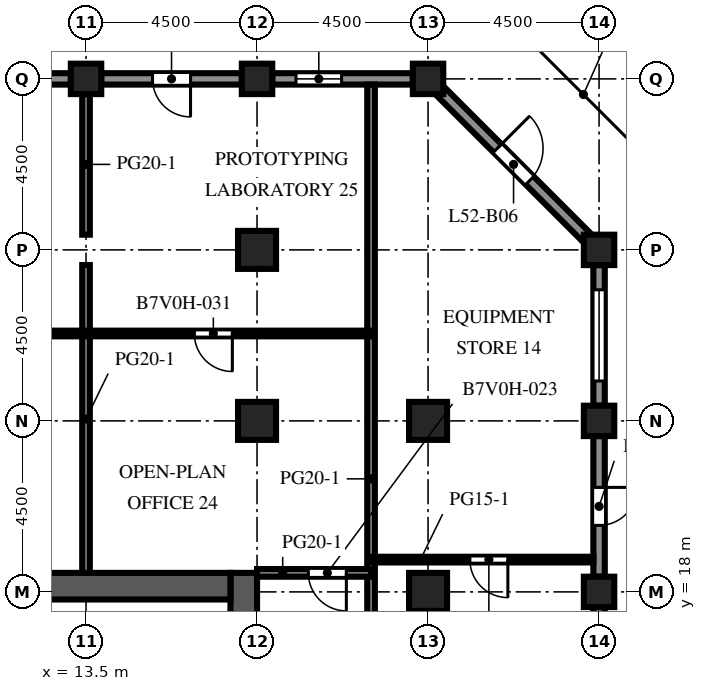
"""IFC4 building model, lengths in metres.
Left out: names, types, materials, properties, quantities, classifications, styles, units other than length and angle.
Written with IfcOpenShell. Run it as: python <this file> out.ifc"""

import sys

from ifc_helpers import new_model, si_unit, direction, frame, frame_2d, origin, origin_2d, place, context, subcontext, project, spatial, rectangle, extrude, element, fill, save


model = new_model("IFC4")
c1 = context("Model", 3, precision=1e-05, world=origin(), true_north=direction((0.0, 1.0)))
c2 = subcontext(c1, "Body", "Model", "MODEL_VIEW")
j1 = project(units=[si_unit("LENGTHUNIT", "METRE"), si_unit("PLANEANGLEUNIT", "RADIAN")], contexts=[c1])
p1 = place(None, origin())
s1 = spatial("IfcSite", under=j1, at=p1, CompositionType="ELEMENT")
p2 = place(p1, origin())
s2 = spatial("IfcBuilding", under=s1, at=p2, CompositionType="ELEMENT")
p3 = place(p2, frame((0.0, 0.0, 231.6)))
s3 = spatial("IfcBuildingStorey", under=s2, at=p3, CompositionType="ELEMENT", Elevation=231.6)
for number, where, z_axis, x_axis in (
    (1, (13.5, 31.5, -0.45), (0.0, 0.0, 1.0), (1.0, 0.0, 0.0)),
    (2, (18.0, 31.5, -0.45), (0.0, 0.0, 1.0), (1.0, 0.0, 0.0)),
    (3, (22.5, 31.5, -0.45), (0.0, 0.0, 1.0), (1.0, 0.0, 0.0)),
):
    element("IfcColumn", number, at=place(p3, frame(where, z_axis=z_axis, x_axis=x_axis)), inside=s3, PredefinedType="COLUMN", context=c2, shape_type="SweptSolid", body=[
        extrude(rectangle(XDim=0.8, YDim=0.8, at=origin_2d()), origin(), (0.0, 0.0, 1.0), 4.55),
    ])
for number, where, z_axis, x_axis in (
    (4, (27.0, 18.0, 0.0), (0.0, 0.0, 1.0), (1.0, 0.0, 0.0)),
    (5, (27.0, 22.5, 0.0), (0.0, 0.0, 1.0), (1.0, 0.0, 0.0)),
    (6, (27.0, 27.0, 0.0), (0.0, 0.0, 1.0), (1.0, 0.0, 0.0)),
):
    element("IfcColumn", number, at=place(p3, frame(where, z_axis=z_axis, x_axis=x_axis)), inside=s3, PredefinedType="COLUMN", context=c2, shape_type="SweptSolid", body=[
        extrude(rectangle(XDim=0.8, YDim=0.8, at=origin_2d()), origin(), (0.0, 0.0, 1.0), 4.1),
    ])
for number, where, z_axis, x_axis in (
    (7, (18.0, 22.5, -0.45), (0.0, 0.0, 1.0), (1.0, 0.0, 0.0)),
    (8, (18.0, 27.0, -0.45), (0.0, 0.0, 1.0), (1.0, 0.0, 0.0)),
):
    element("IfcColumn", number, at=place(p3, frame(where, z_axis=z_axis, x_axis=x_axis)), inside=s3, PredefinedType="COLUMN", context=c2, shape_type="SweptSolid", body=[
        extrude(rectangle(XDim=1.0, YDim=1.0, at=origin_2d()), origin(), (0.0, 0.0, 1.0), 4.55),
    ])
for number, where, z_axis, x_axis in (
    (9, (22.5, 18.0, 0.0), (0.0, 0.0, 1.0), (1.0, 0.0, 0.0)),
    (10, (22.5, 22.5, 0.0), (0.0, 0.0, 1.0), (1.0, 0.0, 0.0)),
):
    element("IfcColumn", number, at=place(p3, frame(where, z_axis=z_axis, x_axis=x_axis)), inside=s3, PredefinedType="COLUMN", context=c2, shape_type="SweptSolid", body=[
        extrude(rectangle(XDim=1.0, YDim=1.0, at=origin_2d()), origin(), (0.0, 0.0, 1.0), 4.1),
    ])
p4 = place(p3, frame((17.65, -9.0, 0.0), z_axis=(0.0, 0.0, 1.0), x_axis=(0.0, 1.0, 0.0)))
e11 = element("IfcWall", 11, at=p4, inside=s3, PredefinedType="SHEAR", context=c2, shape_type="SweptSolid", body=[
    extrude(rectangle(XDim=27.5, YDim=0.7, at=frame_2d((13.75, 0.0))), origin(), (0.0, 0.0, 1.0), 4.1),
])
p5 = place(p4, frame((12.55, 0.0, 0.0)))
e12 = element("IfcOpeningElement", 12, at=p5, cuts=e11, PredefinedType="OPENING", context=c2, shape_type="SweptSolid", body=[
    extrude(rectangle(XDim=2.4, YDim=2.4, at=frame_2d((1.2, 1.2))), frame((0.0, 0.36, 0.0), z_axis=(0.0, -1.0, 0.0), x_axis=(1.0, 0.0, 0.0)), (0.0, 0.0, 1.0), 0.72),
])
p6 = place(p4, frame((6.825, 0.0, 0.0)))
e13 = element("IfcOpeningElement", 13, at=p6, cuts=e11, PredefinedType="OPENING", context=c2, shape_type="SweptSolid", body=[
    extrude(rectangle(XDim=1.2, YDim=2.1, at=frame_2d((0.6, 1.05))), frame((0.0, 0.36, 0.0), z_axis=(0.0, -1.0, 0.0), x_axis=(1.0, 0.0, 0.0)), (0.0, 0.0, 1.0), 0.72),
])
p7 = place(p4, frame((19.475, 0.0, 0.0)))
e14 = element("IfcOpeningElement", 14, at=p7, cuts=e11, PredefinedType="OPENING", context=c2, shape_type="SweptSolid", body=[
    extrude(rectangle(XDim=1.2, YDim=2.1, at=frame_2d((0.6, 1.05))), frame((0.0, 0.36, 0.0), z_axis=(0.0, -1.0, 0.0), x_axis=(1.0, 0.0, 0.0)), (0.0, 0.0, 1.0), 0.72),
])
p8 = place(p3, frame((6.7, 18.15, 0.0), z_axis=(0.0, 0.0, 1.0), x_axis=(1.0, 0.0, 0.0)))
e15 = element("IfcWall", 15, at=p8, inside=s3, PredefinedType="SHEAR", context=c2, shape_type="SweptSolid", body=[
    extrude(rectangle(XDim=10.6, YDim=0.7, at=frame_2d((5.3, 0.0))), origin(), (0.0, 0.0, 1.0), 4.1),
])
p9 = place(p3, frame((27.0, 17.6, 0.0), z_axis=(0.0, 0.0, 1.0), x_axis=(0.0, -1.0, 0.0)))
e16 = element("IfcWall", 16, at=p9, inside=s3, PredefinedType="SOLIDWALL", context=c2, shape_type="SweptSolid", body=[
    extrude(rectangle(XDim=3.7, YDim=0.3, at=frame_2d((1.85, 0.0))), origin(), (0.0, 0.0, 1.0), 2.85),
])
p10 = place(p9, frame((0.65, 0.0, 0.8)))
e17 = element("IfcOpeningElement", 17, at=p10, cuts=e16, PredefinedType="OPENING", context=c2, shape_type="SweptSolid", body=[
    extrude(rectangle(XDim=2.4, YDim=1.7, at=frame_2d((1.2, 0.85))), frame((0.0, 0.16, 0.0), z_axis=(0.0, -1.0, 0.0), x_axis=(1.0, 0.0, 0.0)), (0.0, 0.0, 1.0), 0.32),
])
p11 = place(p3, frame((27.0, 22.1, 0.0), z_axis=(0.0, 0.0, 1.0), x_axis=(0.0, -1.0, 0.0)))
e18 = element("IfcWall", 18, at=p11, inside=s3, PredefinedType="SOLIDWALL", context=c2, shape_type="SweptSolid", body=[
    extrude(rectangle(XDim=3.7, YDim=0.3, at=frame_2d((1.85, 0.0))), origin(), (0.0, 0.0, 1.0), 2.85),
])
p12 = place(p11, frame((1.35, 0.0, 0.0)))
e19 = element("IfcOpeningElement", 19, at=p12, cuts=e18, PredefinedType="OPENING", context=c2, shape_type="SweptSolid", body=[
    extrude(rectangle(XDim=1.0, YDim=2.2, at=frame_2d((0.5, 1.1))), frame((0.0, 0.16, 0.0), z_axis=(0.0, -1.0, 0.0), x_axis=(1.0, 0.0, 0.0)), (0.0, 0.0, 1.0), 0.32),
])
p13 = place(p3, frame((27.0, 26.6, 0.0), z_axis=(0.0, 0.0, 1.0), x_axis=(0.0, -1.0, 0.0)))
e20 = element("IfcWall", 20, at=p13, inside=s3, PredefinedType="SOLIDWALL", context=c2, shape_type="SweptSolid", body=[
    extrude(rectangle(XDim=3.7, YDim=0.3, at=frame_2d((1.85, 0.0))), origin(), (0.0, 0.0, 1.0), 2.85),
])
p14 = place(p13, frame((0.65, 0.0, 0.8)))
e21 = element("IfcOpeningElement", 21, at=p14, cuts=e20, PredefinedType="OPENING", context=c2, shape_type="SweptSolid", body=[
    extrude(rectangle(XDim=2.4, YDim=1.7, at=frame_2d((1.2, 0.85))), frame((0.0, 0.16, 0.0), z_axis=(0.0, -1.0, 0.0), x_axis=(1.0, 0.0, 0.0)), (0.0, 0.0, 1.0), 0.32),
])
p15 = place(p3, frame((22.794, 31.206, 0.0), z_axis=(0.0, 0.0, 1.0), x_axis=(0.707106781187, -0.707106781187, 0.0)))
e22 = element("IfcWall", 22, at=p15, inside=s3, PredefinedType="SOLIDWALL", context=c2, shape_type="SweptSolid", body=[
    extrude(rectangle(XDim=5.532, YDim=0.3, at=frame_2d((2.766, 0.0))), origin(), (0.0, 0.0, 1.0), 2.85),
])
p16 = place(p15, frame((2.166, 0.0, 0.0)))
e23 = element("IfcOpeningElement", 23, at=p16, cuts=e22, PredefinedType="OPENING", context=c2, shape_type="SweptSolid", body=[
    extrude(rectangle(XDim=1.2, YDim=2.2, at=frame_2d((0.6, 1.1))), frame((0.0, 0.16, 0.0), z_axis=(0.0, -1.0, 0.0), x_axis=(1.0, 0.0, 0.0)), (0.0, 0.0, 1.0), 0.32),
])
p17 = place(p3, frame((18.4, 31.5, 0.0), z_axis=(0.0, 0.0, 1.0), x_axis=(1.0, 0.0, 0.0)))
e24 = element("IfcWall", 24, at=p17, inside=s3, PredefinedType="SOLIDWALL", context=c2, shape_type="SweptSolid", body=[
    extrude(rectangle(XDim=3.7, YDim=0.3, at=frame_2d((1.85, 0.0))), origin(), (0.0, 0.0, 1.0), 2.85),
])
p18 = place(p17, frame((0.625, 0.0, 0.8)))
e25 = element("IfcOpeningElement", 25, at=p18, cuts=e24, PredefinedType="OPENING", context=c2, shape_type="SweptSolid", body=[
    extrude(rectangle(XDim=1.2, YDim=1.7, at=frame_2d((0.6, 0.85))), frame((0.0, 0.16, 0.0), z_axis=(0.0, -1.0, 0.0), x_axis=(1.0, 0.0, 0.0)), (0.0, 0.0, 1.0), 0.32),
])
p19 = place(p3, frame((13.9, 31.5, 0.0), z_axis=(0.0, 0.0, 1.0), x_axis=(1.0, 0.0, 0.0)))
e26 = element("IfcWall", 26, at=p19, inside=s3, PredefinedType="SOLIDWALL", context=c2, shape_type="SweptSolid", body=[
    extrude(rectangle(XDim=3.7, YDim=0.3, at=frame_2d((1.85, 0.0))), origin(), (0.0, 0.0, 1.0), 2.85),
])
p20 = place(p19, frame((1.35, 0.0, 0.0)))
e27 = element("IfcOpeningElement", 27, at=p20, cuts=e26, PredefinedType="OPENING", context=c2, shape_type="SweptSolid", body=[
    extrude(rectangle(XDim=1.0, YDim=2.2, at=frame_2d((0.5, 1.1))), frame((0.0, 0.16, 0.0), z_axis=(0.0, -1.0, 0.0), x_axis=(1.0, 0.0, 0.0)), (0.0, 0.0, 1.0), 0.32),
])
p21 = place(p3, frame((9.4, 31.5, 0.0), z_axis=(0.0, 0.0, 1.0), x_axis=(1.0, 0.0, 0.0)))
e28 = element("IfcWall", 28, at=p21, inside=s3, PredefinedType="SOLIDWALL", context=c2, shape_type="SweptSolid", body=[
    extrude(rectangle(XDim=3.7, YDim=0.3, at=frame_2d((1.85, 0.0))), origin(), (0.0, 0.0, 1.0), 2.85),
])
p22 = place(p21, frame((0.65, 0.0, 0.8)))
e29 = element("IfcOpeningElement", 29, at=p22, cuts=e28, PredefinedType="OPENING", context=c2, shape_type="SweptSolid", body=[
    extrude(rectangle(XDim=2.4, YDim=1.7, at=frame_2d((1.2, 0.85))), frame((0.0, 0.16, 0.0), z_axis=(0.0, -1.0, 0.0), x_axis=(1.0, 0.0, 0.0)), (0.0, 0.0, 1.0), 0.32),
])
p23 = place(p3, frame((13.5, 18.5, 0.0), z_axis=(0.0, 0.0, 1.0), x_axis=(0.0, 1.0, 0.0)))
e30 = element("IfcWall", 30, at=p23, inside=s3, PredefinedType="PARTITIONING", context=c2, shape_type="SweptSolid", body=[
    extrude(rectangle(XDim=8.1, YDim=0.2, at=frame_2d((4.05, 0.0))), origin(), (0.0, 0.0, 1.0), 3.65),
])
p24 = place(p3, frame((13.5, 27.4, 0.0), z_axis=(0.0, 0.0, 1.0), x_axis=(0.0, 1.0, 0.0)))
e31 = element("IfcWall", 31, at=p24, inside=s3, PredefinedType="PARTITIONING", context=c2, shape_type="SweptSolid", body=[
    extrude(rectangle(XDim=3.7, YDim=0.2, at=frame_2d((1.85, 0.0))), origin(), (0.0, 0.0, 1.0), 3.65),
])
p25 = place(p3, frame((21.0, 31.35, 0.0), z_axis=(0.0, 0.0, 1.0), x_axis=(0.0, -1.0, 0.0)))
e32 = element("IfcWall", 32, at=p25, inside=s3, PredefinedType="PARTITIONING", context=c2, shape_type="SweptSolid", body=[
    extrude(rectangle(XDim=25.1, YDim=0.2, at=frame_2d((12.55, 0.0))), origin(), (0.0, 0.0, 1.0), 3.65),
])
p26 = place(p25, frame((20.75, 0.0, 0.0)))
e33 = element("IfcOpeningElement", 33, at=p26, cuts=e32, PredefinedType="OPENING", context=c2, shape_type="SweptSolid", body=[
    extrude(rectangle(XDim=1.0, YDim=2.1, at=frame_2d((0.5, 1.05))), frame((0.0, 0.11, 0.0), z_axis=(0.0, -1.0, 0.0), x_axis=(1.0, 0.0, 0.0)), (0.0, 0.0, 1.0), 0.22),
])
p27 = place(p3, frame((18.0, 18.5, 0.0), z_axis=(0.0, 0.0, 1.0), x_axis=(1.0, 0.0, 0.0)))
e34 = element("IfcWall", 34, at=p27, inside=s3, PredefinedType="PARTITIONING", context=c2, shape_type="SweptSolid", body=[
    extrude(rectangle(XDim=3.0, YDim=0.2, at=frame_2d((1.5, 0.0))), origin(), (0.0, 0.0, 1.0), 3.65),
])
p28 = place(p27, frame((1.35, 0.0, 0.0)))
e35 = element("IfcOpeningElement", 35, at=p28, cuts=e34, PredefinedType="OPENING", context=c2, shape_type="SweptSolid", body=[
    extrude(rectangle(XDim=1.0, YDim=2.1, at=frame_2d((0.5, 1.05))), frame((0.0, 0.11, 0.0), z_axis=(0.0, -1.0, 0.0), x_axis=(1.0, 0.0, 0.0)), (0.0, 0.0, 1.0), 0.22),
])
p29 = place(p3, frame((21.0, 18.85, 0.0), z_axis=(0.0, 0.0, 1.0), x_axis=(1.0, 0.0, 0.0)))
e36 = element("IfcWall", 36, at=p29, inside=s3, PredefinedType="PARTITIONING", context=c2, shape_type="SweptSolid", body=[
    extrude(rectangle(XDim=5.85, YDim=0.15, at=frame_2d((2.925, 0.0))), origin(), (0.0, 0.0, 1.0), 3.65),
])
p30 = place(p29, frame((2.6, 0.0, 0.0)))
e37 = element("IfcOpeningElement", 37, at=p30, cuts=e36, PredefinedType="OPENING", context=c2, shape_type="SweptSolid", body=[
    extrude(rectangle(XDim=1.0, YDim=2.1, at=frame_2d((0.5, 1.05))), frame((0.0, 0.085, 0.0), z_axis=(0.0, -1.0, 0.0), x_axis=(1.0, 0.0, 0.0)), (0.0, 0.0, 1.0), 0.17),
])
p31 = place(p3, frame((-13.5, 24.8, 0.0), z_axis=(0.0, 0.0, 1.0), x_axis=(1.0, 0.0, 0.0)))
e38 = element("IfcWall", 38, at=p31, inside=s3, PredefinedType="PARTITIONING", context=c2, shape_type="SweptSolid", body=[
    extrude(rectangle(XDim=34.5, YDim=0.15, at=frame_2d((17.25, 0.0))), origin(), (0.0, 0.0, 1.0), 3.65),
])
p32 = place(p31, frame((1.35, 0.0, 0.0)))
e39 = element("IfcOpeningElement", 39, at=p32, cuts=e38, PredefinedType="OPENING", context=c2, shape_type="SweptSolid", body=[
    extrude(rectangle(XDim=1.0, YDim=2.1, at=frame_2d((0.5, 1.05))), frame((0.0, 0.085, 0.0), z_axis=(0.0, -1.0, 0.0), x_axis=(1.0, 0.0, 0.0)), (0.0, 0.0, 1.0), 0.17),
])
p33 = place(p31, frame((12.0, 0.0, 0.0)))
e40 = element("IfcOpeningElement", 40, at=p33, cuts=e38, PredefinedType="OPENING", context=c2, shape_type="SweptSolid", body=[
    extrude(rectangle(XDim=1.0, YDim=2.1, at=frame_2d((0.5, 1.05))), frame((0.0, 0.085, 0.0), z_axis=(0.0, -1.0, 0.0), x_axis=(1.0, 0.0, 0.0)), (0.0, 0.0, 1.0), 0.17),
])
p34 = place(p31, frame((20.85, 0.0, 0.0)))
e41 = element("IfcOpeningElement", 41, at=p34, cuts=e38, PredefinedType="OPENING", context=c2, shape_type="SweptSolid", body=[
    extrude(rectangle(XDim=1.0, YDim=2.1, at=frame_2d((0.5, 1.05))), frame((0.0, 0.085, 0.0), z_axis=(0.0, -1.0, 0.0), x_axis=(1.0, 0.0, 0.0)), (0.0, 0.0, 1.0), 0.17),
])
p35 = place(p31, frame((29.85, 0.0, 0.0)))
e42 = element("IfcOpeningElement", 42, at=p35, cuts=e38, PredefinedType="OPENING", context=c2, shape_type="SweptSolid", body=[
    extrude(rectangle(XDim=1.0, YDim=2.1, at=frame_2d((0.5, 1.05))), frame((0.0, 0.085, 0.0), z_axis=(0.0, -1.0, 0.0), x_axis=(1.0, 0.0, 0.0)), (0.0, 0.0, 1.0), 0.17),
])
p36 = place(p12, origin())
e43 = element("IfcDoor", 43, at=p36, inside=s3, OperationType="SINGLE_SWING_LEFT", PredefinedType="DOOR", context=c2, shape_type="SweptSolid", body=[
    extrude(rectangle(XDim=1.0, YDim=2.2, at=frame_2d((0.5, 1.1))), frame((0.0, 0.025, 0.0), z_axis=(0.0, -1.0, 0.0), x_axis=(1.0, 0.0, 0.0)), (0.0, 0.0, 1.0), 0.05),
])
fill(e19, e43)
p37 = place(p14, origin())
e44 = element("IfcWindow", 44, at=p37, inside=s3, PartitioningType="SINGLE_PANEL", PredefinedType="WINDOW", context=c2, shape_type="SweptSolid", body=[
    extrude(rectangle(XDim=2.4, YDim=1.7, at=frame_2d((1.2, 0.85))), frame((0.0, 0.03, 0.0), z_axis=(0.0, -1.0, 0.0), x_axis=(1.0, 0.0, 0.0)), (0.0, 0.0, 1.0), 0.06),
])
fill(e21, e44)
p38 = place(p16, origin())
e45 = element("IfcDoor", 45, at=p38, inside=s3, OperationType="SINGLE_SWING_LEFT", PredefinedType="DOOR", context=c2, shape_type="SweptSolid", body=[
    extrude(rectangle(XDim=1.2, YDim=2.2, at=frame_2d((0.6, 1.1))), frame((0.0, 0.025, 0.0), z_axis=(0.0, -1.0, 0.0), x_axis=(1.0, 0.0, 0.0)), (0.0, 0.0, 1.0), 0.05),
])
fill(e23, e45)
p39 = place(p18, origin())
e46 = element("IfcWindow", 46, at=p39, inside=s3, PartitioningType="SINGLE_PANEL", PredefinedType="WINDOW", context=c2, shape_type="SweptSolid", body=[
    extrude(rectangle(XDim=1.2, YDim=1.7, at=frame_2d((0.6, 0.85))), frame((0.0, 0.03, 0.0), z_axis=(0.0, -1.0, 0.0), x_axis=(1.0, 0.0, 0.0)), (0.0, 0.0, 1.0), 0.06),
])
fill(e25, e46)
p40 = place(p20, origin())
e47 = element("IfcDoor", 47, at=p40, inside=s3, OperationType="SINGLE_SWING_RIGHT", PredefinedType="DOOR", context=c2, shape_type="SweptSolid", body=[
    extrude(rectangle(XDim=1.0, YDim=2.2, at=frame_2d((0.5, 1.1))), frame((0.0, 0.025, 0.0), z_axis=(0.0, -1.0, 0.0), x_axis=(1.0, 0.0, 0.0)), (0.0, 0.0, 1.0), 0.05),
])
fill(e27, e47)
p41 = place(p28, origin())
e48 = element("IfcDoor", 48, at=p41, inside=s3, OperationType="SINGLE_SWING_RIGHT", PredefinedType="DOOR", context=c2, shape_type="SweptSolid", body=[
    extrude(rectangle(XDim=1.0, YDim=2.1, at=frame_2d((0.5, 1.05))), frame((0.0, 0.025, 0.0), z_axis=(0.0, -1.0, 0.0), x_axis=(1.0, 0.0, 0.0)), (0.0, 0.0, 1.0), 0.05),
])
fill(e35, e48)
p42 = place(p30, origin())
e49 = element("IfcDoor", 49, at=p42, inside=s3, OperationType="SINGLE_SWING_RIGHT", PredefinedType="DOOR", context=c2, shape_type="SweptSolid", body=[
    extrude(rectangle(XDim=1.0, YDim=2.1, at=frame_2d((0.5, 1.05))), frame((0.0, 0.025, 0.0), z_axis=(0.0, -1.0, 0.0), x_axis=(1.0, 0.0, 0.0)), (0.0, 0.0, 1.0), 0.05),
])
fill(e37, e49)
p43 = place(p35, origin())
e50 = element("IfcDoor", 50, at=p43, inside=s3, OperationType="SINGLE_SWING_RIGHT", PredefinedType="DOOR", context=c2, shape_type="SweptSolid", body=[
    extrude(rectangle(XDim=1.0, YDim=2.1, at=frame_2d((0.5, 1.05))), frame((0.0, 0.025, 0.0), z_axis=(0.0, -1.0, 0.0), x_axis=(1.0, 0.0, 0.0)), (0.0, 0.0, 1.0), 0.05),
])
fill(e42, e50)
save(model, sys.argv[1])
